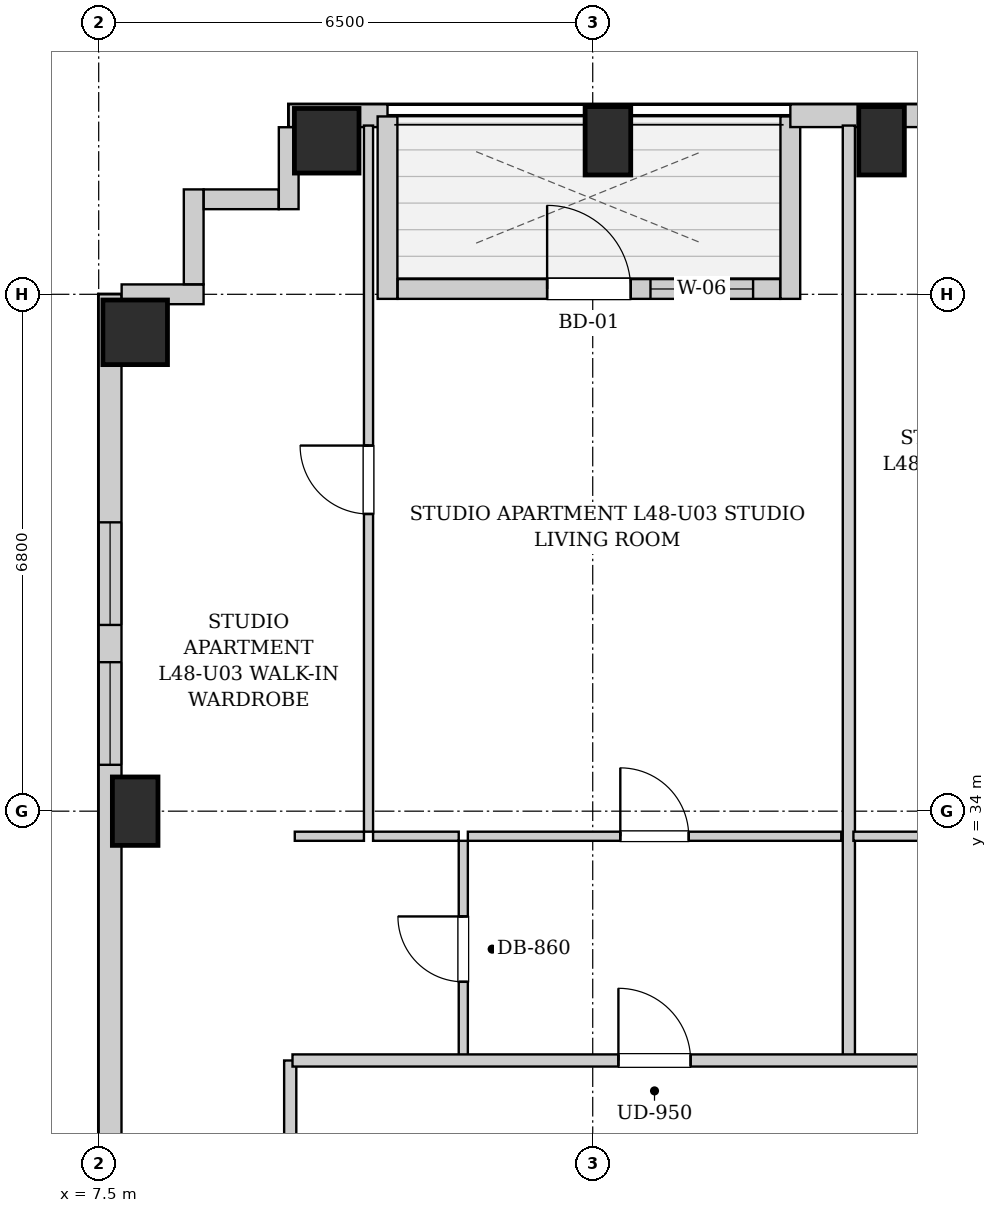
"""IFC4 building model, lengths in metres.
Left out: names, types, materials, properties, quantities, classifications, styles, units other than length and angle.
Written with IfcOpenShell. Run it as: python <this file> out.ifc"""

import sys

from ifc_helpers import new_model, si_unit, direction, frame, frame_2d, origin, origin_2d, place, context, subcontext, project, spatial, rectangle, extrude, element, fill, save


model = new_model("IFC4")
c1 = context("Model", 3, precision=1e-05, world=origin(), true_north=direction((0.0, 1.0)))
c2 = subcontext(c1, "Body", "Model", "MODEL_VIEW")
j1 = project(units=[si_unit("LENGTHUNIT", "METRE"), si_unit("PLANEANGLEUNIT", "RADIAN")], contexts=[c1])
p1 = place(None, origin())
s1 = spatial("IfcSite", under=j1, at=p1, CompositionType="ELEMENT")
p2 = place(p1, origin())
s2 = spatial("IfcBuilding", under=s1, at=p2, CompositionType="ELEMENT")
p3 = place(p2, frame((0.0, 0.0, 166.65)))
s3 = spatial("IfcBuildingStorey", under=s2, at=p3, CompositionType="ELEMENT", Elevation=166.65)
p4 = place(p3, frame((10.5, 42.82, 0.0), z_axis=(0.0, 0.0, 1.0), x_axis=(1.0, 0.0, 0.0)))
e1 = element("IfcColumn", 1, at=p4, inside=s3, PredefinedType="COLUMN", context=c2, shape_type="SweptSolid", body=[
    extrude(rectangle(XDim=0.85, YDim=0.85, at=origin_2d()), origin(), (0.0, 0.0, 1.0), 3.25),
])
for number, where, z_axis, x_axis in (
    (2, (14.2, 42.82, 0.0), (0.0, 0.0, 1.0), (1.0, 0.0, 0.0)),
    (3, (17.8, 42.82, 0.0), (0.0, 0.0, 1.0), (1.0, 0.0, 0.0)),
    (4, (7.98, 34.0, 0.0), (0.0, 0.0, 1.0), (1.0, 0.0, 0.0)),
):
    element("IfcColumn", number, at=place(p3, frame(where, z_axis=z_axis, x_axis=x_axis)), inside=s3, PredefinedType="COLUMN", context=c2, shape_type="SweptSolid", body=[
        extrude(rectangle(XDim=0.6, YDim=0.9, at=origin_2d()), origin(), (0.0, 0.0, 1.0), 3.25),
    ])
p5 = place(p3, frame((7.98, 40.3, 0.0), z_axis=(0.0, 0.0, 1.0), x_axis=(1.0, 0.0, 0.0)))
e5 = element("IfcColumn", 5, at=p5, inside=s3, PredefinedType="COLUMN", context=c2, shape_type="SweptSolid", body=[
    extrude(rectangle(XDim=0.85, YDim=0.85, at=origin_2d()), origin(), (0.0, 0.0, 1.0), 3.25),
])
p6 = place(p3, frame((10.0, 43.15, 0.0), z_axis=(0.0, 0.0, 1.0), x_axis=(1.0, 0.0, 0.0)))
e6 = element("IfcWall", 6, at=p6, inside=s3, PredefinedType="SOLIDWALL", context=c2, shape_type="SweptSolid", body=[
    extrude(rectangle(XDim=1.3, YDim=0.3, at=frame_2d((0.65, 0.0))), origin(), (0.0, 0.0, 1.0), 2.93),
])
p7 = place(p3, frame((11.3, 43.14, 0.0), z_axis=(0.0, 0.0, 1.0), x_axis=(0.0, -1.0, 0.0)))
e7 = element("IfcWall", 7, at=p7, inside=s3, PredefinedType="SOLIDWALL", context=c2, shape_type="SweptSolid", body=[
    extrude(rectangle(XDim=2.4, YDim=0.26, at=frame_2d((1.2, 0.0))), origin(), (0.0, 0.0, 1.0), 2.93),
])
p8 = place(p3, frame((11.434, 40.87, 0.0), z_axis=(0.0, 0.0, 1.0), x_axis=(1.0, 0.0, 0.0)))
e8 = element("IfcWall", 8, at=p8, inside=s3, PredefinedType="SOLIDWALL", context=c2, shape_type="SweptSolid", body=[
    extrude(rectangle(XDim=5.032, YDim=0.26, at=frame_2d((2.516, 0.0))), origin(), (0.0, 0.0, 1.0), 2.93),
])
p9 = place(p8, frame((1.966, 0.0, 0.0)))
e9 = element("IfcOpeningElement", 9, at=p9, cuts=e8, PredefinedType="OPENING", context=c2, shape_type="SweptSolid", body=[
    extrude(rectangle(XDim=1.1, YDim=2.0, at=frame_2d((0.55, 1.0))), frame((0.0, 0.14, 0.0), z_axis=(0.0, -1.0, 0.0), x_axis=(1.0, 0.0, 0.0)), (0.0, 0.0, 1.0), 0.28),
])
p10 = place(p8, frame((3.326, 0.0, 0.85)))
e10 = element("IfcOpeningElement", 10, at=p10, cuts=e8, PredefinedType="OPENING", context=c2, shape_type="SweptSolid", body=[
    extrude(rectangle(XDim=1.35, YDim=1.65, at=frame_2d((0.675, 0.825))), frame((0.0, 0.14, 0.0), z_axis=(0.0, -1.0, 0.0), x_axis=(1.0, 0.0, 0.0)), (0.0, 0.0, 1.0), 0.28),
])
p11 = place(p3, frame((16.6, 40.74, 0.0), z_axis=(0.0, 0.0, 1.0), x_axis=(0.0, 1.0, 0.0)))
e11 = element("IfcWall", 11, at=p11, inside=s3, PredefinedType="SOLIDWALL", context=c2, shape_type="SweptSolid", body=[
    extrude(rectangle(XDim=2.4, YDim=0.26, at=frame_2d((1.2, 0.0))), origin(), (0.0, 0.0, 1.0), 2.93),
])
p12 = place(p3, frame((16.6, 43.15, 0.0), z_axis=(0.0, 0.0, 1.0), x_axis=(1.0, 0.0, 0.0)))
e12 = element("IfcWall", 12, at=p12, inside=s3, PredefinedType="SOLIDWALL", context=c2, shape_type="SweptSolid", body=[
    extrude(rectangle(XDim=13.55, YDim=0.3, at=frame_2d((6.775, 0.0))), origin(), (0.0, 0.0, 1.0), 2.93),
])
p13 = place(p12, frame((2.186, 0.0, 0.55)))
e13 = element("IfcOpeningElement", 13, at=p13, cuts=e12, PredefinedType="OPENING", context=c2, shape_type="SweptSolid", body=[
    extrude(rectangle(XDim=1.35, YDim=1.2, at=frame_2d((0.675, 0.6))), frame((0.0, 0.16, 0.0), z_axis=(0.0, -1.0, 0.0), x_axis=(1.0, 0.0, 0.0)), (0.0, 0.0, 1.0), 0.32),
])
p14 = place(p12, frame((10.9, 0.0, 0.55)))
e14 = element("IfcOpeningElement", 14, at=p14, cuts=e12, PredefinedType="OPENING", context=c2, shape_type="SweptSolid", body=[
    extrude(rectangle(XDim=1.35, YDim=1.2, at=frame_2d((0.675, 0.6))), frame((0.0, 0.16, 0.0), z_axis=(0.0, -1.0, 0.0), x_axis=(1.0, 0.0, 0.0)), (0.0, 0.0, 1.0), 0.32),
])
p15 = place(p3, frame((7.65, 6.3, 0.0), z_axis=(0.0, 0.0, 1.0), x_axis=(0.0, 1.0, 0.0)))
e15 = element("IfcWall", 15, at=p15, inside=s3, PredefinedType="SOLIDWALL", context=c2, shape_type="SweptSolid", body=[
    extrude(rectangle(XDim=34.5, YDim=0.3, at=frame_2d((17.25, 0.0))), origin(), (0.0, 0.0, 1.0), 2.93),
])
p16 = place(p15, frame((1.425, 0.0, 0.55)))
e16 = element("IfcOpeningElement", 16, at=p16, cuts=e15, PredefinedType="OPENING", context=c2, shape_type="SweptSolid", body=[
    extrude(rectangle(XDim=1.35, YDim=1.2, at=frame_2d((0.675, 0.6))), frame((0.0, 0.16, 0.0), z_axis=(0.0, -1.0, 0.0), x_axis=(1.0, 0.0, 0.0)), (0.0, 0.0, 1.0), 0.32),
])
p17 = place(p15, frame((30.15, 0.0, 0.55)))
e17 = element("IfcOpeningElement", 17, at=p17, cuts=e15, PredefinedType="OPENING", context=c2, shape_type="SweptSolid", body=[
    extrude(rectangle(XDim=1.35, YDim=1.2, at=frame_2d((0.675, 0.6))), frame((0.0, 0.16, 0.0), z_axis=(0.0, -1.0, 0.0), x_axis=(1.0, 0.0, 0.0)), (0.0, 0.0, 1.0), 0.32),
])
p18 = place(p15, frame((28.31, 0.0, 0.55)))
e18 = element("IfcOpeningElement", 18, at=p18, cuts=e15, PredefinedType="OPENING", context=c2, shape_type="SweptSolid", body=[
    extrude(rectangle(XDim=1.35, YDim=1.2, at=frame_2d((0.675, 0.6))), frame((0.0, 0.16, 0.0), z_axis=(0.0, -1.0, 0.0), x_axis=(1.0, 0.0, 0.0)), (0.0, 0.0, 1.0), 0.32),
])
p19 = place(p15, frame((11.85, 0.0, 0.55)))
e19 = element("IfcOpeningElement", 19, at=p19, cuts=e15, PredefinedType="OPENING", context=c2, shape_type="SweptSolid", body=[
    extrude(rectangle(XDim=1.35, YDim=1.2, at=frame_2d((0.675, 0.6))), frame((0.0, 0.16, 0.0), z_axis=(0.0, -1.0, 0.0), x_axis=(1.0, 0.0, 0.0)), (0.0, 0.0, 1.0), 0.32),
])
p20 = place(p15, frame((9.31, 0.0, 0.55)))
e20 = element("IfcOpeningElement", 20, at=p20, cuts=e15, PredefinedType="OPENING", context=c2, shape_type="SweptSolid", body=[
    extrude(rectangle(XDim=1.35, YDim=1.2, at=frame_2d((0.675, 0.6))), frame((0.0, 0.16, 0.0), z_axis=(0.0, -1.0, 0.0), x_axis=(1.0, 0.0, 0.0)), (0.0, 0.0, 1.0), 0.32),
])
p21 = place(p15, frame((18.975, 0.0, 0.55)))
e21 = element("IfcOpeningElement", 21, at=p21, cuts=e15, PredefinedType="OPENING", context=c2, shape_type="SweptSolid", body=[
    extrude(rectangle(XDim=1.35, YDim=1.2, at=frame_2d((0.675, 0.6))), frame((0.0, 0.16, 0.0), z_axis=(0.0, -1.0, 0.0), x_axis=(1.0, 0.0, 0.0)), (0.0, 0.0, 1.0), 0.32),
])
p22 = place(p15, frame((20.585, 0.0, 0.55)))
e22 = element("IfcOpeningElement", 22, at=p22, cuts=e15, PredefinedType="OPENING", context=c2, shape_type="SweptSolid", body=[
    extrude(rectangle(XDim=1.35, YDim=1.2, at=frame_2d((0.675, 0.6))), frame((0.0, 0.16, 0.0), z_axis=(0.0, -1.0, 0.0), x_axis=(1.0, 0.0, 0.0)), (0.0, 0.0, 1.0), 0.32),
])
p23 = place(p3, frame((7.802, 40.8, 0.0), z_axis=(0.0, 0.0, 1.0), x_axis=(1.0, 0.0, 0.0)))
e23 = element("IfcWall", 23, at=p23, inside=s3, PredefinedType="SOLIDWALL", context=c2, shape_type="SweptSolid", body=[
    extrude(rectangle(XDim=1.078, YDim=0.26, at=frame_2d((0.539, 0.0))), origin(), (0.0, 0.0, 1.0), 2.93),
])
p24 = place(p3, frame((8.75, 40.932, 0.0), z_axis=(0.0, 0.0, 1.0), x_axis=(0.0, 1.0, 0.0)))
e24 = element("IfcWall", 24, at=p24, inside=s3, PredefinedType="SOLIDWALL", context=c2, shape_type="SweptSolid", body=[
    extrude(rectangle(XDim=1.248, YDim=0.26, at=frame_2d((0.624, 0.0))), origin(), (0.0, 0.0, 1.0), 2.93),
])
p25 = place(p3, frame((8.882, 42.05, 0.0), z_axis=(0.0, 0.0, 1.0), x_axis=(1.0, 0.0, 0.0)))
e25 = element("IfcWall", 25, at=p25, inside=s3, PredefinedType="SOLIDWALL", context=c2, shape_type="SweptSolid", body=[
    extrude(rectangle(XDim=0.986, YDim=0.26, at=frame_2d((0.493, 0.0))), origin(), (0.0, 0.0, 1.0), 2.93),
])
p26 = place(p3, frame((10.0, 41.92, 0.0), z_axis=(0.0, 0.0, 1.0), x_axis=(0.0, 1.0, 0.0)))
e26 = element("IfcWall", 26, at=p26, inside=s3, PredefinedType="SOLIDWALL", context=c2, shape_type="SweptSolid", body=[
    extrude(rectangle(XDim=1.078, YDim=0.26, at=frame_2d((0.539, 0.0))), origin(), (0.0, 0.0, 1.0), 2.93),
])
p27 = place(p3, frame((10.02, 28.98, 0.0), z_axis=(0.0, 0.0, 1.0), x_axis=(0.0, 1.0, 0.0)))
e27 = element("IfcWall", 27, at=p27, inside=s3, PredefinedType="PARTITIONING", context=c2, shape_type="SweptSolid", body=[
    extrude(rectangle(XDim=1.74, YDim=0.16, at=frame_2d((0.87, 0.0))), origin(), (0.0, 0.0, 1.0), 2.93),
])
p28 = place(p3, frame((12.297, 30.76, 0.0), z_axis=(0.0, 0.0, 1.0), x_axis=(0.0, 1.0, 0.0)))
e28 = element("IfcWall", 28, at=p28, inside=s3, PredefinedType="PARTITIONING", context=c2, shape_type="SweptSolid", body=[
    extrude(rectangle(XDim=2.85, YDim=0.12, at=frame_2d((1.425, 0.0))), origin(), (0.0, 0.0, 1.0), 2.93),
])
p29 = place(p28, frame((0.995, 0.0, 0.0)))
e29 = element("IfcOpeningElement", 29, at=p29, cuts=e28, PredefinedType="OPENING", context=c2, shape_type="SweptSolid", body=[
    extrude(rectangle(XDim=0.86, YDim=2.05, at=frame_2d((0.43, 1.025))), frame((0.0, 0.07, 0.0), z_axis=(0.0, -1.0, 0.0), x_axis=(1.0, 0.0, 0.0)), (0.0, 0.0, 1.0), 0.14),
])
p30 = place(p3, frame((10.08, 33.67, 0.0), z_axis=(0.0, 0.0, 1.0), x_axis=(1.0, 0.0, 0.0)))
e30 = element("IfcWall", 30, at=p30, inside=s3, PredefinedType="PARTITIONING", context=c2, shape_type="SweptSolid", body=[
    extrude(rectangle(XDim=0.91, YDim=0.12, at=frame_2d((0.455, 0.0))), origin(), (0.0, 0.0, 1.0), 2.93),
])
p31 = place(p3, frame((11.11, 33.67, 0.0), z_axis=(0.0, 0.0, 1.0), x_axis=(1.0, 0.0, 0.0)))
e31 = element("IfcWall", 31, at=p31, inside=s3, PredefinedType="PARTITIONING", context=c2, shape_type="SweptSolid", body=[
    extrude(rectangle(XDim=1.127, YDim=0.12, at=frame_2d((0.563, 0.0))), origin(), (0.0, 0.0, 1.0), 2.93),
])
p32 = place(p3, frame((12.357, 33.67, 0.0), z_axis=(0.0, 0.0, 1.0), x_axis=(1.0, 0.0, 0.0)))
e32 = element("IfcWall", 32, at=p32, inside=s3, PredefinedType="PARTITIONING", context=c2, shape_type="SweptSolid", body=[
    extrude(rectangle(XDim=4.913, YDim=0.12, at=frame_2d((2.457, 0.0))), origin(), (0.0, 0.0, 1.0), 2.93),
])
p33 = place(p32, frame((2.006, 0.0, 0.0)))
e33 = element("IfcOpeningElement", 33, at=p33, cuts=e32, PredefinedType="OPENING", context=c2, shape_type="SweptSolid", body=[
    extrude(rectangle(XDim=0.9, YDim=2.05, at=frame_2d((0.45, 1.025))), frame((0.0, 0.07, 0.0), z_axis=(0.0, -1.0, 0.0), x_axis=(1.0, 0.0, 0.0)), (0.0, 0.0, 1.0), 0.14),
])
p34 = place(p3, frame((11.05, 33.73, 0.0), z_axis=(0.0, 0.0, 1.0), x_axis=(0.0, 1.0, 0.0)))
e34 = element("IfcWall", 34, at=p34, inside=s3, PredefinedType="PARTITIONING", context=c2, shape_type="SweptSolid", body=[
    extrude(rectangle(XDim=9.29, YDim=0.12, at=frame_2d((4.645, 0.0))), origin(), (0.0, 0.0, 1.0), 2.93),
])
p35 = place(p34, frame((4.18, 0.0, 0.0)))
e35 = element("IfcOpeningElement", 35, at=p35, cuts=e34, PredefinedType="OPENING", context=c2, shape_type="SweptSolid", body=[
    extrude(rectangle(XDim=0.9, YDim=2.05, at=frame_2d((0.45, 1.025))), frame((0.0, 0.07, 0.0), z_axis=(0.0, -1.0, 0.0), x_axis=(1.0, 0.0, 0.0)), (0.0, 0.0, 1.0), 0.14),
])
p36 = place(p3, frame((17.37, 30.76, 0.0), z_axis=(0.0, 0.0, 1.0), x_axis=(0.0, 1.0, 0.0)))
e36 = element("IfcWall", 36, at=p36, inside=s3, PredefinedType="PARTITIONING", context=c2, shape_type="SweptSolid", body=[
    extrude(rectangle(XDim=12.26, YDim=0.16, at=frame_2d((6.13, 0.0))), origin(), (0.0, 0.0, 1.0), 2.93),
])
p37 = place(p3, frame((17.43, 33.67, 0.0), z_axis=(0.0, 0.0, 1.0), x_axis=(1.0, 0.0, 0.0)))
e37 = element("IfcWall", 37, at=p37, inside=s3, PredefinedType="PARTITIONING", context=c2, shape_type="SweptSolid", body=[
    extrude(rectangle(XDim=1.85, YDim=0.12, at=frame_2d((0.925, 0.0))), origin(), (0.0, 0.0, 1.0), 2.93),
])
p38 = place(p3, frame((10.05, 30.72, 0.0), z_axis=(0.0, 0.0, 1.0), x_axis=(1.0, 0.0, 0.0)))
e38 = element("IfcWall", 38, at=p38, inside=s3, PredefinedType="PARTITIONING", context=c2, shape_type="SweptSolid", body=[
    extrude(rectangle(XDim=27.7, YDim=0.16, at=frame_2d((13.85, 0.0))), origin(), (0.0, 0.0, 1.0), 2.93),
])
p39 = place(p38, frame((4.288, 0.0, 0.0)))
e39 = element("IfcOpeningElement", 39, at=p39, cuts=e38, PredefinedType="OPENING", context=c2, shape_type="SweptSolid", body=[
    extrude(rectangle(XDim=0.95, YDim=2.1, at=frame_2d((0.475, 1.05))), frame((0.0, 0.09, 0.0), z_axis=(0.0, -1.0, 0.0), x_axis=(1.0, 0.0, 0.0)), (0.0, 0.0, 1.0), 0.18),
])
p40 = place(p38, frame((9.515, 0.0, 0.0)))
e40 = element("IfcOpeningElement", 40, at=p40, cuts=e38, PredefinedType="OPENING", context=c2, shape_type="SweptSolid", body=[
    extrude(rectangle(XDim=0.95, YDim=2.1, at=frame_2d((0.475, 1.05))), frame((0.0, 0.09, 0.0), z_axis=(0.0, -1.0, 0.0), x_axis=(1.0, 0.0, 0.0)), (0.0, 0.0, 1.0), 0.18),
])
p41 = place(p38, frame((15.896, 0.0, 0.0)))
e41 = element("IfcOpeningElement", 41, at=p41, cuts=e38, PredefinedType="OPENING", context=c2, shape_type="SweptSolid", body=[
    extrude(rectangle(XDim=0.95, YDim=2.1, at=frame_2d((0.475, 1.05))), frame((0.0, 0.09, 0.0), z_axis=(0.0, -1.0, 0.0), x_axis=(1.0, 0.0, 0.0)), (0.0, 0.0, 1.0), 0.18),
])
p42 = place(p38, frame((25.925, 0.0, 0.0)))
e42 = element("IfcOpeningElement", 42, at=p42, cuts=e38, PredefinedType="OPENING", context=c2, shape_type="SweptSolid", body=[
    extrude(rectangle(XDim=0.95, YDim=2.1, at=frame_2d((0.475, 1.05))), frame((0.0, 0.09, 0.0), z_axis=(0.0, -1.0, 0.0), x_axis=(1.0, 0.0, 0.0)), (0.0, 0.0, 1.0), 0.18),
])
p43 = place(p29, origin())
e43 = element("IfcDoor", 43, at=p43, inside=s3, OperationType="SINGLE_SWING_RIGHT", PredefinedType="DOOR", context=c2, shape_type="SweptSolid", body=[
    extrude(rectangle(XDim=0.86, YDim=2.05, at=frame_2d((0.43, 1.025))), frame((0.0, 0.025, 0.0), z_axis=(0.0, -1.0, 0.0), x_axis=(1.0, 0.0, 0.0)), (0.0, 0.0, 1.0), 0.05),
])
fill(e29, e43)
p44 = place(p33, origin())
e44 = element("IfcDoor", 44, at=p44, inside=s3, OperationType="SINGLE_SWING_LEFT", PredefinedType="DOOR", context=c2, shape_type="SweptSolid", body=[
    extrude(rectangle(XDim=0.9, YDim=2.05, at=frame_2d((0.45, 1.025))), frame((0.0, 0.025, 0.0), z_axis=(0.0, -1.0, 0.0), x_axis=(1.0, 0.0, 0.0)), (0.0, 0.0, 1.0), 0.05),
])
fill(e33, e44)
p45 = place(p35, origin())
e45 = element("IfcDoor", 45, at=p45, inside=s3, OperationType="SINGLE_SWING_RIGHT", PredefinedType="DOOR", context=c2, shape_type="SweptSolid", body=[
    extrude(rectangle(XDim=0.9, YDim=2.05, at=frame_2d((0.45, 1.025))), frame((0.0, 0.025, 0.0), z_axis=(0.0, -1.0, 0.0), x_axis=(1.0, 0.0, 0.0)), (0.0, 0.0, 1.0), 0.05),
])
fill(e35, e45)
p46 = place(p39, origin())
e46 = element("IfcDoor", 46, at=p46, inside=s3, OperationType="SINGLE_SWING_LEFT", PredefinedType="DOOR", context=c2, shape_type="SweptSolid", body=[
    extrude(rectangle(XDim=0.95, YDim=2.1, at=frame_2d((0.475, 1.05))), frame((0.0, 0.025, 0.0), z_axis=(0.0, -1.0, 0.0), x_axis=(1.0, 0.0, 0.0)), (0.0, 0.0, 1.0), 0.05),
])
fill(e39, e46)
p47 = place(p9, origin())
e47 = element("IfcDoor", 47, at=p47, inside=s3, OperationType="SINGLE_SWING_LEFT", PredefinedType="DOOR", context=c2, shape_type="SweptSolid", body=[
    extrude(rectangle(XDim=1.1, YDim=2.0, at=frame_2d((0.55, 1.0))), frame((0.0, 0.025, 0.0), z_axis=(0.0, -1.0, 0.0), x_axis=(1.0, 0.0, 0.0)), (0.0, 0.0, 1.0), 0.05),
])
fill(e9, e47)
p48 = place(p17, origin())
e48 = element("IfcWindow", 48, at=p48, inside=s3, PartitioningType="SINGLE_PANEL", PredefinedType="WINDOW", context=c2, shape_type="SweptSolid", body=[
    extrude(rectangle(XDim=1.35, YDim=1.2, at=frame_2d((0.675, 0.6))), frame((0.0, 0.03, 0.0), z_axis=(0.0, -1.0, 0.0), x_axis=(1.0, 0.0, 0.0)), (0.0, 0.0, 1.0), 0.06),
])
fill(e17, e48)
p49 = place(p18, origin())
e49 = element("IfcWindow", 49, at=p49, inside=s3, PartitioningType="SINGLE_PANEL", PredefinedType="WINDOW", context=c2, shape_type="SweptSolid", body=[
    extrude(rectangle(XDim=1.35, YDim=1.2, at=frame_2d((0.675, 0.6))), frame((0.0, 0.03, 0.0), z_axis=(0.0, -1.0, 0.0), x_axis=(1.0, 0.0, 0.0)), (0.0, 0.0, 1.0), 0.06),
])
fill(e18, e49)
p50 = place(p10, origin())
e50 = element("IfcWindow", 50, at=p50, inside=s3, PartitioningType="SINGLE_PANEL", PredefinedType="WINDOW", context=c2, shape_type="SweptSolid", body=[
    extrude(rectangle(XDim=1.35, YDim=1.65, at=frame_2d((0.675, 0.825))), frame((0.0, 0.03, 0.0), z_axis=(0.0, -1.0, 0.0), x_axis=(1.0, 0.0, 0.0)), (0.0, 0.0, 1.0), 0.06),
])
fill(e10, e50)
save(model, sys.argv[1])
